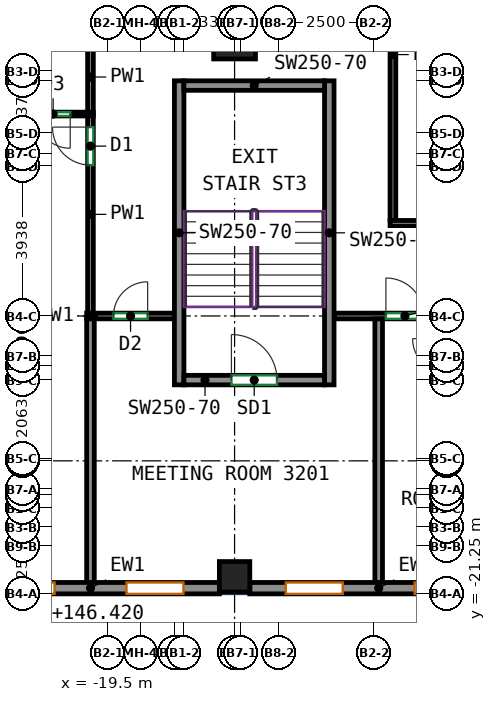
"""IFC4 building model, lengths in metres.
Left out: names, types, materials, properties, quantities, classifications, styles, units other than length and angle.
Written with IfcOpenShell. Run it as: python <this file> out.ifc"""

import sys

from ifc_helpers import new_model, si_unit, direction, frame, frame_2d, origin, origin_2d, place, context, subcontext, project, spatial, rectangle, extrude, source, transform, mapped, element, fill, save


model = new_model("IFC4")
c1 = context("Model", 3, precision=1e-05, world=origin(), true_north=direction((0.0, 1.0)))
c2 = subcontext(c1, "Body", "Model", "MODEL_VIEW")
j1 = project(units=[si_unit("LENGTHUNIT", "METRE"), si_unit("PLANEANGLEUNIT", "RADIAN")], contexts=[c1])
p1 = place(None, origin())
s1 = spatial("IfcSite", under=j1, at=p1, CompositionType="ELEMENT")
p2 = place(p1, origin())
s2 = spatial("IfcBuilding", under=s1, at=p2, CompositionType="ELEMENT")
p3 = place(p2, frame((0.0, 0.0, 143.9)))
s3 = spatial("IfcBuildingStorey", under=s2, at=p3, CompositionType="ELEMENT", Elevation=143.9)
m1 = source(origin(), c2, "Body", "SweptSolid", [
    extrude(rectangle(XDim=0.8, YDim=0.8, at=origin_2d()), origin(), (0.0, 0.0, 1.0), 3.12),
])
p4 = place(p3, frame((-16.167, -20.8, 0.0), z_axis=(0.0, 0.0, 1.0), x_axis=(1.0, 0.0, 0.0)))
e1 = element("IfcColumn", 1, at=p4, inside=s3, PredefinedType="COLUMN", context=c2, shape_type="MappedRepresentation", body=[
    mapped(m1, transform((0.0, 0.0, 0.0))),
])
m2 = source(origin(), c2, "Body", "SweptSolid", [
    extrude(rectangle(XDim=1.1, YDim=1.1, at=origin_2d()), origin(), (0.0, 0.0, 1.0), 3.12),
])
p5 = place(p3, frame((-16.167, -6.625, 0.0), z_axis=(0.0, 0.0, 1.0), x_axis=(1.0, 0.0, 0.0)))
e2 = element("IfcColumn", 2, at=p5, inside=s3, PredefinedType="COLUMN", context=c2, shape_type="MappedRepresentation", body=[
    mapped(m2, transform((0.0, 0.0, 0.0))),
])
m3 = source(origin(), c2, "Body", "SweptSolid", [
    extrude(rectangle(XDim=8.0, YDim=0.25, at=frame_2d((4.0, 0.0))), origin(), (0.0, 0.0, 1.0), 3.12),
])
for number, where, z_axis, x_axis in (
    (3, (-17.625, -15.75, 0.0), (0.0, 0.0, 1.0), (0.0, 1.0, 0.0)),
    (4, (-13.675, -15.75, 0.0), (0.0, 0.0, 1.0), (0.0, 1.0, 0.0)),
):
    element("IfcWall", number, at=place(p3, frame(where, z_axis=z_axis, x_axis=x_axis)), inside=s3, PredefinedType="SHEAR", context=c2, shape_type="MappedRepresentation", body=[
        mapped(m3, transform((0.0, 0.0, 0.0))),
    ])
m4 = source(origin(), c2, "Body", "SweptSolid", [
    extrude(rectangle(XDim=3.7, YDim=0.25, at=frame_2d((1.85, 0.0))), origin(), (0.0, 0.0, 1.0), 3.12),
])
p6 = place(p3, frame((-17.5, -15.625, 0.0), z_axis=(0.0, 0.0, 1.0), x_axis=(1.0, 0.0, 0.0)))
e5 = element("IfcWall", 5, at=p6, inside=s3, PredefinedType="SHEAR", context=c2, shape_type="MappedRepresentation", body=[
    mapped(m4, transform((0.0, 0.0, 0.0))),
])
p7 = place(p6, frame((1.25, 0.0, 0.0)))
e6 = element("IfcOpeningElement", 6, at=p7, cuts=e5, PredefinedType="OPENING", context=c2, shape_type="SweptSolid", body=[
    extrude(rectangle(XDim=1.2, YDim=2.1, at=frame_2d((0.6, 1.05))), frame((0.0, 0.135, 0.0), z_axis=(0.0, -1.0, 0.0), x_axis=(1.0, 0.0, 0.0)), (0.0, 0.0, 1.0), 0.27),
])
p8 = place(p3, frame((-17.5, -7.875, 0.0), z_axis=(0.0, 0.0, 1.0), x_axis=(1.0, 0.0, 0.0)))
e7 = element("IfcWall", 7, at=p8, inside=s3, PredefinedType="SHEAR", context=c2, shape_type="MappedRepresentation", body=[
    mapped(m4, transform((0.0, 0.0, 0.0))),
])
m5 = source(origin(), c2, "Body", "SweptSolid", [
    extrude(rectangle(XDim=6.783, YDim=0.3, at=frame_2d((3.392, 0.0))), origin(), (0.0, 0.0, 1.0), 3.12),
])
p9 = place(p3, frame((-23.35, -21.1, 0.0), z_axis=(0.0, 0.0, 1.0), x_axis=(1.0, 0.0, 0.0)))
e8 = element("IfcWall", 8, at=p9, inside=s3, PredefinedType="SOLIDWALL", context=c2, shape_type="MappedRepresentation", body=[
    mapped(m5, transform((0.0, 0.0, 0.0))),
])
p10 = place(p9, frame((0.946, 0.0, 0.85)))
e9 = element("IfcOpeningElement", 9, at=p10, cuts=e8, PredefinedType="OPENING", context=c2, shape_type="SweptSolid", body=[
    extrude(rectangle(XDim=1.5, YDim=1.95, at=frame_2d((0.75, 0.975))), frame((0.0, 0.16, 0.0), z_axis=(0.0, -1.0, 0.0), x_axis=(1.0, 0.0, 0.0)), (0.0, 0.0, 1.0), 0.32),
])
p11 = place(p9, frame((4.337, 0.0, 0.85)))
e10 = element("IfcOpeningElement", 10, at=p11, cuts=e8, PredefinedType="OPENING", context=c2, shape_type="SweptSolid", body=[
    extrude(rectangle(XDim=1.5, YDim=1.95, at=frame_2d((0.75, 0.975))), frame((0.0, 0.16, 0.0), z_axis=(0.0, -1.0, 0.0), x_axis=(1.0, 0.0, 0.0)), (0.0, 0.0, 1.0), 0.32),
])
m6 = source(origin(), c2, "Body", "SweptSolid", [
    extrude(rectangle(XDim=6.783, YDim=0.3, at=frame_2d((3.392, 0.0))), origin(), (0.0, 0.0, 1.0), 3.12),
])
p12 = place(p3, frame((-15.767, -21.1, 0.0), z_axis=(0.0, 0.0, 1.0), x_axis=(1.0, 0.0, 0.0)))
e11 = element("IfcWall", 11, at=p12, inside=s3, PredefinedType="SOLIDWALL", context=c2, shape_type="MappedRepresentation", body=[
    mapped(m6, transform((0.0, 0.0, 0.0))),
])
p13 = place(p12, frame((0.946, 0.0, 0.85)))
e12 = element("IfcOpeningElement", 12, at=p13, cuts=e11, PredefinedType="OPENING", context=c2, shape_type="SweptSolid", body=[
    extrude(rectangle(XDim=1.5, YDim=1.95, at=frame_2d((0.75, 0.975))), frame((0.0, 0.16, 0.0), z_axis=(0.0, -1.0, 0.0), x_axis=(1.0, 0.0, 0.0)), (0.0, 0.0, 1.0), 0.32),
])
p14 = place(p12, frame((4.338, 0.0, 0.85)))
e13 = element("IfcOpeningElement", 13, at=p14, cuts=e11, PredefinedType="OPENING", context=c2, shape_type="SweptSolid", body=[
    extrude(rectangle(XDim=1.5, YDim=1.95, at=frame_2d((0.75, 0.975))), frame((0.0, 0.16, 0.0), z_axis=(0.0, -1.0, 0.0), x_axis=(1.0, 0.0, 0.0)), (0.0, 0.0, 1.0), 0.32),
])
p15 = place(p3, frame((-13.55, -13.938, 0.0), z_axis=(0.0, 0.0, 1.0), x_axis=(1.0, 0.0, 0.0)))
e14 = element("IfcWall", 14, at=p15, inside=s3, PredefinedType="PARTITIONING", context=c2, shape_type="SweptSolid", body=[
    extrude(rectangle(XDim=4.417, YDim=0.15, at=frame_2d((2.208, 0.0))), origin(), (0.0, 0.0, 1.0), 3.12),
])
p16 = place(p15, frame((1.365, 0.0, 0.0)))
e15 = element("IfcOpeningElement", 15, at=p16, cuts=e14, PredefinedType="OPENING", context=c2, shape_type="SweptSolid", body=[
    extrude(rectangle(XDim=1.0, YDim=2.1, at=frame_2d((0.5, 1.05))), frame((0.0, 0.085, 0.0), z_axis=(0.0, -1.0, 0.0), x_axis=(1.0, 0.0, 0.0)), (0.0, 0.0, 1.0), 0.17),
])
p17 = place(p3, frame((-20.059, -13.938, 0.0), z_axis=(0.0, 0.0, 1.0), x_axis=(1.0, 0.0, 0.0)))
e16 = element("IfcWall", 16, at=p17, inside=s3, PredefinedType="PARTITIONING", context=c2, shape_type="SweptSolid", body=[
    extrude(rectangle(XDim=2.309, YDim=0.15, at=frame_2d((1.155, 0.0))), origin(), (0.0, 0.0, 1.0), 3.12),
])
p18 = place(p17, frame((0.705, 0.0, 0.0)))
e17 = element("IfcOpeningElement", 17, at=p18, cuts=e16, PredefinedType="OPENING", context=c2, shape_type="SweptSolid", body=[
    extrude(rectangle(XDim=0.9, YDim=2.1, at=frame_2d((0.45, 1.05))), frame((0.0, 0.085, 0.0), z_axis=(0.0, -1.0, 0.0), x_axis=(1.0, 0.0, 0.0)), (0.0, 0.0, 1.0), 0.17),
])
p19 = place(p3, frame((-19.959, -13.863, 0.0), z_axis=(0.0, 0.0, 1.0), x_axis=(0.0, 1.0, 0.0)))
e18 = element("IfcWall", 18, at=p19, inside=s3, PredefinedType="PARTITIONING", context=c2, shape_type="SweptSolid", body=[
    extrude(rectangle(XDim=5.198, YDim=0.15, at=frame_2d((2.599, 0.0))), origin(), (0.0, 0.0, 1.0), 3.12),
])
p20 = place(p19, frame((3.895, 0.0, 0.0)))
e19 = element("IfcOpeningElement", 19, at=p20, cuts=e18, PredefinedType="OPENING", context=c2, shape_type="SweptSolid", body=[
    extrude(rectangle(XDim=1.0, YDim=2.1, at=frame_2d((0.5, 1.05))), frame((0.0, 0.085, 0.0), z_axis=(0.0, -1.0, 0.0), x_axis=(1.0, 0.0, 0.0)), (0.0, 0.0, 1.0), 0.17),
])
p21 = place(p3, frame((-19.959, -8.585, 0.0), z_axis=(0.0, 0.0, 1.0), x_axis=(0.0, 1.0, 0.0)))
e20 = element("IfcWall", 20, at=p21, inside=s3, PredefinedType="PARTITIONING", context=c2, shape_type="SweptSolid", body=[
    extrude(rectangle(XDim=1.87, YDim=0.15, at=frame_2d((0.935, 0.0))), origin(), (0.0, 0.0, 1.0), 3.12),
])
p22 = place(p3, frame((-12.0, -11.425, 0.0), z_axis=(0.0, 0.0, 1.0), x_axis=(0.0, 1.0, 0.0)))
e21 = element("IfcWall", 21, at=p22, inside=s3, PredefinedType="PARTITIONING", context=c2, shape_type="SweptSolid", body=[
    extrude(rectangle(XDim=14.55, YDim=0.15, at=frame_2d((7.275, 0.0))), origin(), (0.0, 0.0, 1.0), 3.12),
])
p23 = place(p22, frame((7.327, 0.0, 0.0)))
e22 = element("IfcOpeningElement", 22, at=p23, cuts=e21, PredefinedType="OPENING", context=c2, shape_type="SweptSolid", body=[
    extrude(rectangle(XDim=0.9, YDim=2.1, at=frame_2d((0.45, 1.05))), frame((0.0, 0.085, 0.0), z_axis=(0.0, -1.0, 0.0), x_axis=(1.0, 0.0, 0.0)), (0.0, 0.0, 1.0), 0.17),
])
p24 = place(p3, frame((-12.075, -11.5, 0.0), z_axis=(0.0, 0.0, 1.0), x_axis=(1.0, 0.0, 0.0)))
e23 = element("IfcWall", 23, at=p24, inside=s3, PredefinedType="PARTITIONING", context=c2, shape_type="SweptSolid", body=[
    extrude(rectangle(XDim=28.35, YDim=0.15, at=frame_2d((14.175, 0.0))), origin(), (0.0, 0.0, 1.0), 3.12),
])
p25 = place(p24, frame((13.677, 0.0, 0.0)))
e24 = element("IfcOpeningElement", 24, at=p25, cuts=e23, PredefinedType="OPENING", context=c2, shape_type="SweptSolid", body=[
    extrude(rectangle(XDim=0.9, YDim=2.1, at=frame_2d((0.45, 1.05))), frame((0.0, 0.085, 0.0), z_axis=(0.0, -1.0, 0.0), x_axis=(1.0, 0.0, 0.0)), (0.0, 0.0, 1.0), 0.17),
])
for number, where, z_axis, x_axis in (
    (25, (-12.375, -21.0, 0.0), (0.0, 0.0, 1.0), (0.0, 1.0, 0.0)),
    (26, (-19.959, -21.0, 0.0), (0.0, 0.0, 1.0), (0.0, 1.0, 0.0)),
):
    element("IfcWall", number, at=place(p3, frame(where, z_axis=z_axis, x_axis=x_axis)), inside=s3, PredefinedType="PARTITIONING", context=c2, shape_type="SweptSolid", body=[
        extrude(rectangle(XDim=6.985, YDim=0.2, at=frame_2d((3.493, 0.0))), origin(), (0.0, 0.0, 1.0), 3.12),
    ])
p26 = place(p3, frame((-19.886, -8.625, 0.0), z_axis=(0.0, 0.0, 1.0), x_axis=(-1.0, 0.0, 0.0)))
e27 = element("IfcWall", 27, at=p26, inside=s3, PredefinedType="PARTITIONING", context=c2, shape_type="SweptSolid", body=[
    extrude(rectangle(XDim=2.823, YDim=0.1, at=frame_2d((1.412, 0.0))), origin(), (0.0, 0.0, 1.0), 3.12),
])
p27 = place(p26, frame((0.606, 0.0, 0.0)))
e28 = element("IfcOpeningElement", 28, at=p27, cuts=e27, PredefinedType="OPENING", context=c2, shape_type="SweptSolid", body=[
    extrude(rectangle(XDim=0.9, YDim=2.1, at=frame_2d((0.45, 1.05))), frame((0.0, 0.06, 0.0), z_axis=(0.0, -1.0, 0.0), x_axis=(1.0, 0.0, 0.0)), (0.0, 0.0, 1.0), 0.12),
])
p28 = place(p10, origin())
e29 = element("IfcWindow", 29, at=p28, inside=s3, PartitioningType="SINGLE_PANEL", PredefinedType="WINDOW", context=c2, shape_type="SweptSolid", body=[
    extrude(rectangle(XDim=1.5, YDim=1.95, at=frame_2d((0.75, 0.975))), frame((0.0, 0.03, 0.0), z_axis=(0.0, -1.0, 0.0), x_axis=(1.0, 0.0, 0.0)), (0.0, 0.0, 1.0), 0.06),
])
fill(e9, e29)
p29 = place(p11, origin())
e30 = element("IfcWindow", 30, at=p29, inside=s3, PartitioningType="SINGLE_PANEL", PredefinedType="WINDOW", context=c2, shape_type="SweptSolid", body=[
    extrude(rectangle(XDim=1.5, YDim=1.95, at=frame_2d((0.75, 0.975))), frame((0.0, 0.03, 0.0), z_axis=(0.0, -1.0, 0.0), x_axis=(1.0, 0.0, 0.0)), (0.0, 0.0, 1.0), 0.06),
])
fill(e10, e30)
p30 = place(p13, origin())
e31 = element("IfcWindow", 31, at=p30, inside=s3, PartitioningType="SINGLE_PANEL", PredefinedType="WINDOW", context=c2, shape_type="SweptSolid", body=[
    extrude(rectangle(XDim=1.5, YDim=1.95, at=frame_2d((0.75, 0.975))), frame((0.0, 0.03, 0.0), z_axis=(0.0, -1.0, 0.0), x_axis=(1.0, 0.0, 0.0)), (0.0, 0.0, 1.0), 0.06),
])
fill(e12, e31)
p31 = place(p14, origin())
e32 = element("IfcWindow", 32, at=p31, inside=s3, PartitioningType="SINGLE_PANEL", PredefinedType="WINDOW", context=c2, shape_type="SweptSolid", body=[
    extrude(rectangle(XDim=1.5, YDim=1.95, at=frame_2d((0.75, 0.975))), frame((0.0, 0.03, 0.0), z_axis=(0.0, -1.0, 0.0), x_axis=(1.0, 0.0, 0.0)), (0.0, 0.0, 1.0), 0.06),
])
fill(e13, e32)
p32 = place(p7, origin())
e33 = element("IfcDoor", 33, at=p32, inside=s3, OperationType="DOUBLE_DOOR_SINGLE_SWING", PredefinedType="DOOR", context=c2, shape_type="SweptSolid", body=[
    extrude(rectangle(XDim=1.2, YDim=2.1, at=frame_2d((0.6, 1.05))), frame((0.0, 0.025, 0.0), z_axis=(0.0, -1.0, 0.0), x_axis=(1.0, 0.0, 0.0)), (0.0, 0.0, 1.0), 0.05),
])
fill(e6, e33)
p33 = place(p18, origin())
e34 = element("IfcDoor", 34, at=p33, inside=s3, OperationType="SINGLE_SWING_RIGHT", PredefinedType="DOOR", context=c2, shape_type="SweptSolid", body=[
    extrude(rectangle(XDim=0.9, YDim=2.1, at=frame_2d((0.45, 1.05))), frame((0.0, 0.025, 0.0), z_axis=(0.0, -1.0, 0.0), x_axis=(1.0, 0.0, 0.0)), (0.0, 0.0, 1.0), 0.05),
])
fill(e17, e34)
p34 = place(p16, origin())
e35 = element("IfcDoor", 35, at=p34, inside=s3, OperationType="SINGLE_SWING_LEFT", PredefinedType="DOOR", context=c2, shape_type="SweptSolid", body=[
    extrude(rectangle(XDim=1.0, YDim=2.1, at=frame_2d((0.5, 1.05))), frame((0.0, 0.025, 0.0), z_axis=(0.0, -1.0, 0.0), x_axis=(1.0, 0.0, 0.0)), (0.0, 0.0, 1.0), 0.05),
])
fill(e15, e35)
p35 = place(p20, origin())
e36 = element("IfcDoor", 36, at=p35, inside=s3, OperationType="SINGLE_SWING_RIGHT", PredefinedType="DOOR", context=c2, shape_type="SweptSolid", body=[
    extrude(rectangle(XDim=1.0, YDim=2.1, at=frame_2d((0.5, 1.05))), frame((0.0, 0.025, 0.0), z_axis=(0.0, -1.0, 0.0), x_axis=(1.0, 0.0, 0.0)), (0.0, 0.0, 1.0), 0.05),
])
fill(e19, e36)
p36 = place(p27, origin())
e37 = element("IfcDoor", 37, at=p36, inside=s3, OperationType="SINGLE_SWING_LEFT", PredefinedType="DOOR", context=c2, shape_type="SweptSolid", body=[
    extrude(rectangle(XDim=0.9, YDim=2.1, at=frame_2d((0.45, 1.05))), frame((0.0, 0.025, 0.0), z_axis=(0.0, -1.0, 0.0), x_axis=(1.0, 0.0, 0.0)), (0.0, 0.0, 1.0), 0.05),
])
fill(e28, e37)
save(model, sys.argv[1])
